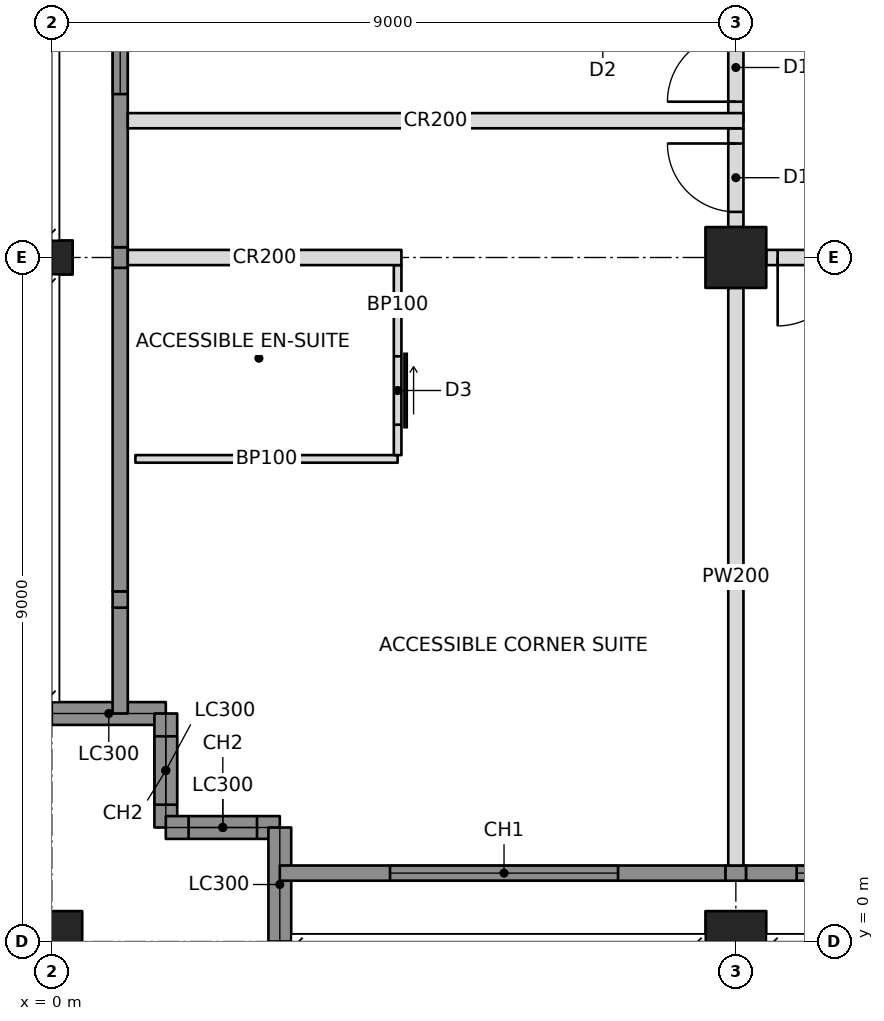
"""IFC4 building model, lengths in metres.
Left out: names, types, materials, properties, quantities, classifications, styles, units other than length and angle.
Written with IfcOpenShell. Run it as: python <this file> out.ifc"""

import sys

from ifc_helpers import new_model, si_unit, direction, frame, frame_2d, origin, origin_with_axes, origin_2d, place, context, subcontext, project, spatial, rectangle, hollow_rectangle, i_section, extrude, element, fill, save


model = new_model("IFC4")
c1 = context("Model", 3, precision=1e-05, world=origin(), true_north=direction((0.0, 1.0)))
c2 = subcontext(c1, "Body", "Model", "MODEL_VIEW")
j1 = project(units=[si_unit("LENGTHUNIT", "METRE"), si_unit("PLANEANGLEUNIT", "RADIAN")], contexts=[c1])
p1 = place(None, origin())
s1 = spatial("IfcSite", under=j1, at=p1, CompositionType="ELEMENT")
p2 = place(p1, origin())
s2 = spatial("IfcBuilding", under=s1, at=p2, CompositionType="ELEMENT")
p3 = place(p2, frame((0.0, 0.0, 177.4)))
s3 = spatial("IfcBuildingStorey", under=s2, at=p3, CompositionType="ELEMENT", Elevation=177.4)
p4 = place(p3, origin_with_axes())
e1 = element("IfcColumn", 1, at=p4, inside=s3, PredefinedType="COLUMN", context=c2, shape_type="SweptSolid", body=[
    extrude(hollow_rectangle(XDim=0.8, YDim=0.8, WallThickness=0.07, at=origin_2d()), origin(), (0.0, 0.0, 1.0), 3.4),
])
p5 = place(p3, frame((0.0, 9.0, 0.0), z_axis=(0.0, 0.0, 1.0), x_axis=(0.0, 1.0, 0.0)))
e2 = element("IfcColumn", 2, at=p5, inside=s3, PredefinedType="COLUMN", context=c2, shape_type="SweptSolid", body=[
    extrude(i_section(OverallWidth=0.449, OverallDepth=0.549, WebThickness=0.072, FlangeThickness=0.115, at=origin_2d()), origin(), (0.0, 0.0, 1.0), 3.4),
])
p6 = place(p3, frame((9.0, 0.0, 0.0), z_axis=(0.0, 0.0, 1.0), x_axis=(1.0, 0.0, 0.0)))
e3 = element("IfcColumn", 3, at=p6, inside=s3, PredefinedType="COLUMN", context=c2, shape_type="SweptSolid", body=[
    extrude(hollow_rectangle(XDim=0.8, YDim=0.8, WallThickness=0.07, at=origin_2d()), origin(), (0.0, 0.0, 1.0), 3.4),
])
p7 = place(p3, frame((9.0, 9.0, 0.0), z_axis=(0.0, 0.0, 1.0), x_axis=(1.0, 0.0, 0.0)))
e4 = element("IfcColumn", 4, at=p7, inside=s3, PredefinedType="COLUMN", context=c2, shape_type="SweptSolid", body=[
    extrude(hollow_rectangle(XDim=0.8, YDim=0.8, WallThickness=0.06, at=origin_2d()), origin(), (0.0, 0.0, 1.0), 3.4),
])
p8 = place(p3, frame((0.0, 3.0, 0.0), z_axis=(0.0, 0.0, 1.0), x_axis=(1.0, 0.0, 0.0)))
e5 = element("IfcWall", 5, at=p8, inside=s3, PredefinedType="SOLIDWALL", context=c2, shape_type="SweptSolid", body=[
    extrude(rectangle(XDim=1.5, YDim=0.3, at=frame_2d((0.75, 0.0))), origin(), (0.0, 0.0, 1.0), 2.42),
])
p9 = place(p3, frame((1.5, 3.0, 0.0), z_axis=(0.0, 0.0, 1.0), x_axis=(0.0, -1.0, 0.0)))
e6 = element("IfcWall", 6, at=p9, inside=s3, PredefinedType="SOLIDWALL", context=c2, shape_type="SweptSolid", body=[
    extrude(rectangle(XDim=1.5, YDim=0.3, at=frame_2d((0.75, 0.0))), origin(), (0.0, 0.0, 1.0), 3.2),
])
p10 = place(p9, frame((0.3, 0.0, 0.6)))
e7 = element("IfcOpeningElement", 7, at=p10, cuts=e6, PredefinedType="OPENING", context=c2, shape_type="SweptSolid", body=[
    extrude(rectangle(XDim=0.9, YDim=2.2, at=frame_2d((0.45, 1.1))), frame((0.0, 0.16, 0.0), z_axis=(0.0, -1.0, 0.0), x_axis=(1.0, 0.0, 0.0)), (0.0, 0.0, 1.0), 0.32),
])
p11 = place(p3, frame((1.5, 1.5, 0.0), z_axis=(0.0, 0.0, 1.0), x_axis=(1.0, 0.0, 0.0)))
e8 = element("IfcWall", 8, at=p11, inside=s3, PredefinedType="SOLIDWALL", context=c2, shape_type="SweptSolid", body=[
    extrude(rectangle(XDim=1.5, YDim=0.3, at=frame_2d((0.75, 0.0))), origin(), (0.0, 0.0, 1.0), 3.2),
])
p12 = place(p11, frame((0.3, 0.0, 0.6)))
e9 = element("IfcOpeningElement", 9, at=p12, cuts=e8, PredefinedType="OPENING", context=c2, shape_type="SweptSolid", body=[
    extrude(rectangle(XDim=0.9, YDim=2.2, at=frame_2d((0.45, 1.1))), frame((0.0, 0.16, 0.0), z_axis=(0.0, -1.0, 0.0), x_axis=(1.0, 0.0, 0.0)), (0.0, 0.0, 1.0), 0.32),
])
p13 = place(p3, frame((3.0, 1.5, 0.0), z_axis=(0.0, 0.0, 1.0), x_axis=(0.0, -1.0, 0.0)))
e10 = element("IfcWall", 10, at=p13, inside=s3, PredefinedType="SOLIDWALL", context=c2, shape_type="SweptSolid", body=[
    extrude(rectangle(XDim=1.5, YDim=0.3, at=frame_2d((0.75, 0.0))), origin(), (0.0, 0.0, 1.0), 2.42),
])
p14 = place(p3, frame((3.0, 0.9, 0.0), z_axis=(0.0, 0.0, 1.0), x_axis=(1.0, 0.0, 0.0)))
e11 = element("IfcWall", 11, at=p14, inside=s3, PredefinedType="SOLIDWALL", context=c2, shape_type="SweptSolid", body=[
    extrude(rectangle(XDim=5.865, YDim=0.2, at=frame_2d((2.932, 0.0))), origin(), (0.0, 0.0, 1.0), 3.2),
])
p15 = place(p14, frame((1.45, 0.0, 0.6)))
e12 = element("IfcOpeningElement", 12, at=p15, cuts=e11, PredefinedType="OPENING", context=c2, shape_type="SweptSolid", body=[
    extrude(rectangle(XDim=3.0, YDim=2.2, at=frame_2d((1.5, 1.1))), frame((0.0, 0.11, 0.0), z_axis=(0.0, -1.0, 0.0), x_axis=(1.0, 0.0, 0.0)), (0.0, 0.0, 1.0), 0.22),
])
p16 = place(p3, frame((0.9, 3.0, 0.0), z_axis=(0.0, 0.0, 1.0), x_axis=(0.0, 1.0, 0.0)))
e13 = element("IfcWall", 13, at=p16, inside=s3, PredefinedType="SOLIDWALL", context=c2, shape_type="SweptSolid", body=[
    extrude(rectangle(XDim=1.393, YDim=0.2, at=frame_2d((0.696, 0.0))), origin(), (0.0, 0.0, 1.0), 3.2),
])
p17 = place(p3, frame((1.0, 9.0, 0.0), z_axis=(0.0, 0.0, 1.0), x_axis=(1.0, 0.0, 0.0)))
e14 = element("IfcWall", 14, at=p17, inside=s3, PredefinedType="PARTITIONING", context=c2, shape_type="SweptSolid", body=[
    extrude(rectangle(XDim=3.6, YDim=0.2, at=frame_2d((1.8, 0.0))), origin(), (0.0, 0.0, 1.0), 2.438),
])
p18 = place(p3, frame((9.4, 9.0, 0.0), z_axis=(0.0, 0.0, 1.0), x_axis=(1.0, 0.0, 0.0)))
e15 = element("IfcWall", 15, at=p18, inside=s3, PredefinedType="PARTITIONING", context=c2, shape_type="SweptSolid", body=[
    extrude(rectangle(XDim=8.2, YDim=0.2, at=frame_2d((4.1, 0.0))), origin(), (0.0, 0.0, 1.0), 2.405),
])
p19 = place(p18, frame((0.15, 0.0, 0.0)))
e16 = element("IfcOpeningElement", 16, at=p19, cuts=e15, PredefinedType="OPENING", context=c2, shape_type="SweptSolid", body=[
    extrude(rectangle(XDim=0.9, YDim=2.1, at=frame_2d((0.45, 1.05))), frame((0.0, 0.11, 0.0), z_axis=(0.0, -1.0, 0.0), x_axis=(1.0, 0.0, 0.0)), (0.0, 0.0, 1.0), 0.22),
])
p20 = place(p3, frame((9.0, 10.8, 0.0), z_axis=(0.0, 0.0, 1.0), x_axis=(0.0, 1.0, 0.0)))
e17 = element("IfcWall", 17, at=p20, inside=s3, PredefinedType="PARTITIONING", context=c2, shape_type="SweptSolid", body=[
    extrude(rectangle(XDim=6.8, YDim=0.2, at=frame_2d((3.4, 0.0))), origin(), (0.0, 0.0, 1.0), 2.405),
])
p21 = place(p20, frame((0.25, 0.0, 0.0)))
e18 = element("IfcOpeningElement", 18, at=p21, cuts=e17, PredefinedType="OPENING", context=c2, shape_type="SweptSolid", body=[
    extrude(rectangle(XDim=0.9, YDim=2.1, at=frame_2d((0.45, 1.05))), frame((0.0, 0.11, 0.0), z_axis=(0.0, -1.0, 0.0), x_axis=(1.0, 0.0, 0.0)), (0.0, 0.0, 1.0), 0.22),
])
p22 = place(p20, frame((3.85, 0.0, 0.0)))
e19 = element("IfcOpeningElement", 19, at=p22, cuts=e17, PredefinedType="OPENING", context=c2, shape_type="SweptSolid", body=[
    extrude(rectangle(XDim=0.9, YDim=2.1, at=frame_2d((0.45, 1.05))), frame((0.0, 0.11, 0.0), z_axis=(0.0, -1.0, 0.0), x_axis=(1.0, 0.0, 0.0)), (0.0, 0.0, 1.0), 0.22),
])
p23 = place(p3, frame((1.0, 10.8, 0.0), z_axis=(0.0, 0.0, 1.0), x_axis=(1.0, 0.0, 0.0)))
e20 = element("IfcWall", 20, at=p23, inside=s3, PredefinedType="PARTITIONING", context=c2, shape_type="SweptSolid", body=[
    extrude(rectangle(XDim=8.1, YDim=0.2, at=frame_2d((4.05, 0.0))), origin(), (0.0, 0.0, 1.0), 2.404),
])
p24 = place(p3, frame((9.0, 8.6, 0.0), z_axis=(0.0, 0.0, 1.0), x_axis=(0.0, -1.0, 0.0)))
e21 = element("IfcWall", 21, at=p24, inside=s3, PredefinedType="PARTITIONING", context=c2, shape_type="SweptSolid", body=[
    extrude(rectangle(XDim=7.6, YDim=0.2, at=frame_2d((3.8, 0.0))), origin(), (0.0, 0.0, 1.0), 2.438),
])
p25 = place(p3, frame((1.1, 6.35, 0.0), z_axis=(0.0, 0.0, 1.0), x_axis=(1.0, 0.0, 0.0)))
e22 = element("IfcWall", 22, at=p25, inside=s3, PredefinedType="PARTITIONING", context=c2, shape_type="SweptSolid", body=[
    extrude(rectangle(XDim=3.45, YDim=0.1, at=frame_2d((1.725, 0.0))), origin(), (0.0, 0.0, 1.0), 3.2),
])
p26 = place(p3, frame((4.55, 8.9, 0.0), z_axis=(0.0, 0.0, 1.0), x_axis=(0.0, -1.0, 0.0)))
e23 = element("IfcWall", 23, at=p26, inside=s3, PredefinedType="PARTITIONING", context=c2, shape_type="SweptSolid", body=[
    extrude(rectangle(XDim=2.5, YDim=0.1, at=frame_2d((1.25, 0.0))), origin(), (0.0, 0.0, 1.0), 2.438),
])
p27 = place(p26, frame((1.2, 0.0, 0.0)))
e24 = element("IfcOpeningElement", 24, at=p27, cuts=e23, PredefinedType="OPENING", context=c2, shape_type="SweptSolid", body=[
    extrude(rectangle(XDim=0.9, YDim=2.1, at=frame_2d((0.45, 1.05))), frame((0.0, 0.06, 0.0), z_axis=(0.0, -1.0, 0.0), x_axis=(1.0, 0.0, 0.0)), (0.0, 0.0, 1.0), 0.12),
])
p28 = place(p3, frame((9.0, 9.4, 0.0), z_axis=(0.0, 0.0, 1.0), x_axis=(0.0, 1.0, 0.0)))
e25 = element("IfcWall", 25, at=p28, inside=s3, PredefinedType="PARTITIONING", context=c2, shape_type="SweptSolid", body=[
    extrude(rectangle(XDim=1.3, YDim=0.2, at=frame_2d((0.65, 0.0))), origin(), (0.0, 0.0, 1.0), 2.405),
])
p29 = place(p28, frame((0.2, 0.0, 0.0)))
e26 = element("IfcOpeningElement", 26, at=p29, cuts=e25, PredefinedType="OPENING", context=c2, shape_type="SweptSolid", body=[
    extrude(rectangle(XDim=0.9, YDim=2.1, at=frame_2d((0.45, 1.05))), frame((0.0, 0.11, 0.0), z_axis=(0.0, -1.0, 0.0), x_axis=(1.0, 0.0, 0.0)), (0.0, 0.0, 1.0), 0.22),
])
p30 = place(p3, frame((8.865, 0.9, 0.0), z_axis=(0.0, 0.0, 1.0), x_axis=(1.0, 0.0, 0.0)))
e27 = element("IfcWall", 27, at=p30, inside=s3, PredefinedType="SOLIDWALL", context=c2, shape_type="SweptSolid", body=[
    extrude(rectangle(XDim=0.271, YDim=0.2, at=frame_2d((0.135, 0.0))), origin(), (0.0, 0.0, 1.0), 2.438),
])
p31 = place(p3, frame((9.135, 0.9, 0.0), z_axis=(0.0, 0.0, 1.0), x_axis=(1.0, 0.0, 0.0)))
e28 = element("IfcWall", 28, at=p31, inside=s3, PredefinedType="SOLIDWALL", context=c2, shape_type="SweptSolid", body=[
    extrude(rectangle(XDim=8.671, YDim=0.2, at=frame_2d((4.335, 0.0))), origin(), (0.0, 0.0, 1.0), 3.2),
])
p32 = place(p31, frame((0.665, 0.0, 0.6)))
e29 = element("IfcOpeningElement", 29, at=p32, cuts=e28, PredefinedType="OPENING", context=c2, shape_type="SweptSolid", body=[
    extrude(rectangle(XDim=3.0, YDim=2.2, at=frame_2d((1.5, 1.1))), frame((0.0, 0.11, 0.0), z_axis=(0.0, -1.0, 0.0), x_axis=(1.0, 0.0, 0.0)), (0.0, 0.0, 1.0), 0.22),
])
p33 = place(p31, frame((5.065, 0.0, 0.6)))
e30 = element("IfcOpeningElement", 30, at=p33, cuts=e28, PredefinedType="OPENING", context=c2, shape_type="SweptSolid", body=[
    extrude(rectangle(XDim=3.0, YDim=2.2, at=frame_2d((1.5, 1.1))), frame((0.0, 0.11, 0.0), z_axis=(0.0, -1.0, 0.0), x_axis=(1.0, 0.0, 0.0)), (0.0, 0.0, 1.0), 0.22),
])
p34 = place(p3, frame((0.9, 4.393, 0.0), z_axis=(0.0, 0.0, 1.0), x_axis=(0.0, 1.0, 0.0)))
e31 = element("IfcWall", 31, at=p34, inside=s3, PredefinedType="SOLIDWALL", context=c2, shape_type="SweptSolid", body=[
    extrude(rectangle(XDim=0.215, YDim=0.2, at=frame_2d((0.107, 0.0))), origin(), (0.0, 0.0, 1.0), 2.661),
])
p35 = place(p3, frame((0.9, 4.607, 0.0), z_axis=(0.0, 0.0, 1.0), x_axis=(0.0, 1.0, 0.0)))
e32 = element("IfcWall", 32, at=p35, inside=s3, PredefinedType="SOLIDWALL", context=c2, shape_type="SweptSolid", body=[
    extrude(rectangle(XDim=4.257, YDim=0.2, at=frame_2d((2.129, 0.0))), origin(), (0.0, 0.0, 1.0), 3.2),
])
p36 = place(p3, frame((0.9, 8.865, 0.0), z_axis=(0.0, 0.0, 1.0), x_axis=(0.0, 1.0, 0.0)))
e33 = element("IfcWall", 33, at=p36, inside=s3, PredefinedType="SOLIDWALL", context=c2, shape_type="SweptSolid", body=[
    extrude(rectangle(XDim=0.271, YDim=0.2, at=frame_2d((0.135, 0.0))), origin(), (0.0, 0.0, 1.0), 2.438),
])
p37 = place(p3, frame((0.9, 9.135, 0.0), z_axis=(0.0, 0.0, 1.0), x_axis=(0.0, 1.0, 0.0)))
e34 = element("IfcWall", 34, at=p37, inside=s3, PredefinedType="SOLIDWALL", context=c2, shape_type="SweptSolid", body=[
    extrude(rectangle(XDim=8.671, YDim=0.2, at=frame_2d((4.335, 0.0))), origin(), (0.0, 0.0, 1.0), 3.2),
])
p38 = place(p37, frame((2.015, 0.0, 0.6)))
e35 = element("IfcOpeningElement", 35, at=p38, cuts=e34, PredefinedType="OPENING", context=c2, shape_type="SweptSolid", body=[
    extrude(rectangle(XDim=3.0, YDim=2.2, at=frame_2d((1.5, 1.1))), frame((0.0, 0.11, 0.0), z_axis=(0.0, -1.0, 0.0), x_axis=(1.0, 0.0, 0.0)), (0.0, 0.0, 1.0), 0.22),
])
p39 = place(p37, frame((5.515, 0.0, 0.6)))
e36 = element("IfcOpeningElement", 36, at=p39, cuts=e34, PredefinedType="OPENING", context=c2, shape_type="SweptSolid", body=[
    extrude(rectangle(XDim=3.0, YDim=2.2, at=frame_2d((1.5, 1.1))), frame((0.0, 0.11, 0.0), z_axis=(0.0, -1.0, 0.0), x_axis=(1.0, 0.0, 0.0)), (0.0, 0.0, 1.0), 0.22),
])
p40 = place(p10, origin())
e37 = element("IfcWindow", 37, at=p40, inside=s3, PartitioningType="SINGLE_PANEL", PredefinedType="WINDOW", context=c2, shape_type="SweptSolid", body=[
    extrude(rectangle(XDim=0.9, YDim=2.2, at=frame_2d((0.45, 1.1))), frame((0.0, 0.03, 0.0), z_axis=(0.0, -1.0, 0.0), x_axis=(1.0, 0.0, 0.0)), (0.0, 0.0, 1.0), 0.06),
])
fill(e7, e37)
p41 = place(p12, origin())
e38 = element("IfcWindow", 38, at=p41, inside=s3, PartitioningType="SINGLE_PANEL", PredefinedType="WINDOW", context=c2, shape_type="SweptSolid", body=[
    extrude(rectangle(XDim=0.9, YDim=2.2, at=frame_2d((0.45, 1.1))), frame((0.0, 0.03, 0.0), z_axis=(0.0, -1.0, 0.0), x_axis=(1.0, 0.0, 0.0)), (0.0, 0.0, 1.0), 0.06),
])
fill(e9, e38)
p42 = place(p15, origin())
e39 = element("IfcWindow", 39, at=p42, inside=s3, PartitioningType="TRIPLE_PANEL_VERTICAL", PredefinedType="WINDOW", context=c2, shape_type="SweptSolid", body=[
    extrude(rectangle(XDim=3.0, YDim=2.2, at=frame_2d((1.5, 1.1))), frame((0.0, 0.03, 0.0), z_axis=(0.0, -1.0, 0.0), x_axis=(1.0, 0.0, 0.0)), (0.0, 0.0, 1.0), 0.06),
])
fill(e12, e39)
p43 = place(p32, origin())
e40 = element("IfcWindow", 40, at=p43, inside=s3, PartitioningType="TRIPLE_PANEL_VERTICAL", PredefinedType="WINDOW", context=c2, shape_type="SweptSolid", body=[
    extrude(rectangle(XDim=3.0, YDim=2.2, at=frame_2d((1.5, 1.1))), frame((0.0, 0.03, 0.0), z_axis=(0.0, -1.0, 0.0), x_axis=(1.0, 0.0, 0.0)), (0.0, 0.0, 1.0), 0.06),
])
fill(e29, e40)
p44 = place(p38, origin())
e41 = element("IfcWindow", 41, at=p44, inside=s3, PartitioningType="TRIPLE_PANEL_VERTICAL", PredefinedType="WINDOW", context=c2, shape_type="SweptSolid", body=[
    extrude(rectangle(XDim=3.0, YDim=2.2, at=frame_2d((1.5, 1.1))), frame((0.0, 0.03, 0.0), z_axis=(0.0, -1.0, 0.0), x_axis=(1.0, 0.0, 0.0)), (0.0, 0.0, 1.0), 0.06),
])
fill(e35, e41)
p45 = place(p27, origin())
e42 = element("IfcDoor", 42, at=p45, inside=s3, OperationType="SLIDING_TO_LEFT", PredefinedType="DOOR", context=c2, shape_type="SweptSolid", body=[
    extrude(rectangle(XDim=0.9, YDim=2.1, at=frame_2d((0.45, 1.05))), frame((0.0, 0.025, 0.0), z_axis=(0.0, -1.0, 0.0), x_axis=(1.0, 0.0, 0.0)), (0.0, 0.0, 1.0), 0.05),
])
fill(e24, e42)
p46 = place(p19, frame((0.9, 0.0, 0.0), z_axis=(0.0, 0.0, 1.0), x_axis=(-1.0, 0.0, 0.0)))
e43 = element("IfcDoor", 43, at=p46, inside=s3, OperationType="SINGLE_SWING_RIGHT", PredefinedType="DOOR", context=c2, shape_type="SweptSolid", body=[
    extrude(rectangle(XDim=0.9, YDim=2.1, at=frame_2d((0.45, 1.05))), frame((0.0, 0.025, 0.0), z_axis=(0.0, -1.0, 0.0), x_axis=(1.0, 0.0, 0.0)), (0.0, 0.0, 1.0), 0.05),
])
fill(e16, e43)
p47 = place(p21, origin())
e44 = element("IfcDoor", 44, at=p47, inside=s3, OperationType="SINGLE_SWING_LEFT", PredefinedType="DOOR", context=c2, shape_type="SweptSolid", body=[
    extrude(rectangle(XDim=0.9, YDim=2.1, at=frame_2d((0.45, 1.05))), frame((0.0, 0.025, 0.0), z_axis=(0.0, -1.0, 0.0), x_axis=(1.0, 0.0, 0.0)), (0.0, 0.0, 1.0), 0.05),
])
fill(e18, e44)
p48 = place(p29, origin())
e45 = element("IfcDoor", 45, at=p48, inside=s3, OperationType="SINGLE_SWING_RIGHT", PredefinedType="DOOR", context=c2, shape_type="SweptSolid", body=[
    extrude(rectangle(XDim=0.9, YDim=2.1, at=frame_2d((0.45, 1.05))), frame((0.0, 0.025, 0.0), z_axis=(0.0, -1.0, 0.0), x_axis=(1.0, 0.0, 0.0)), (0.0, 0.0, 1.0), 0.05),
])
fill(e26, e45)
save(model, sys.argv[1])
